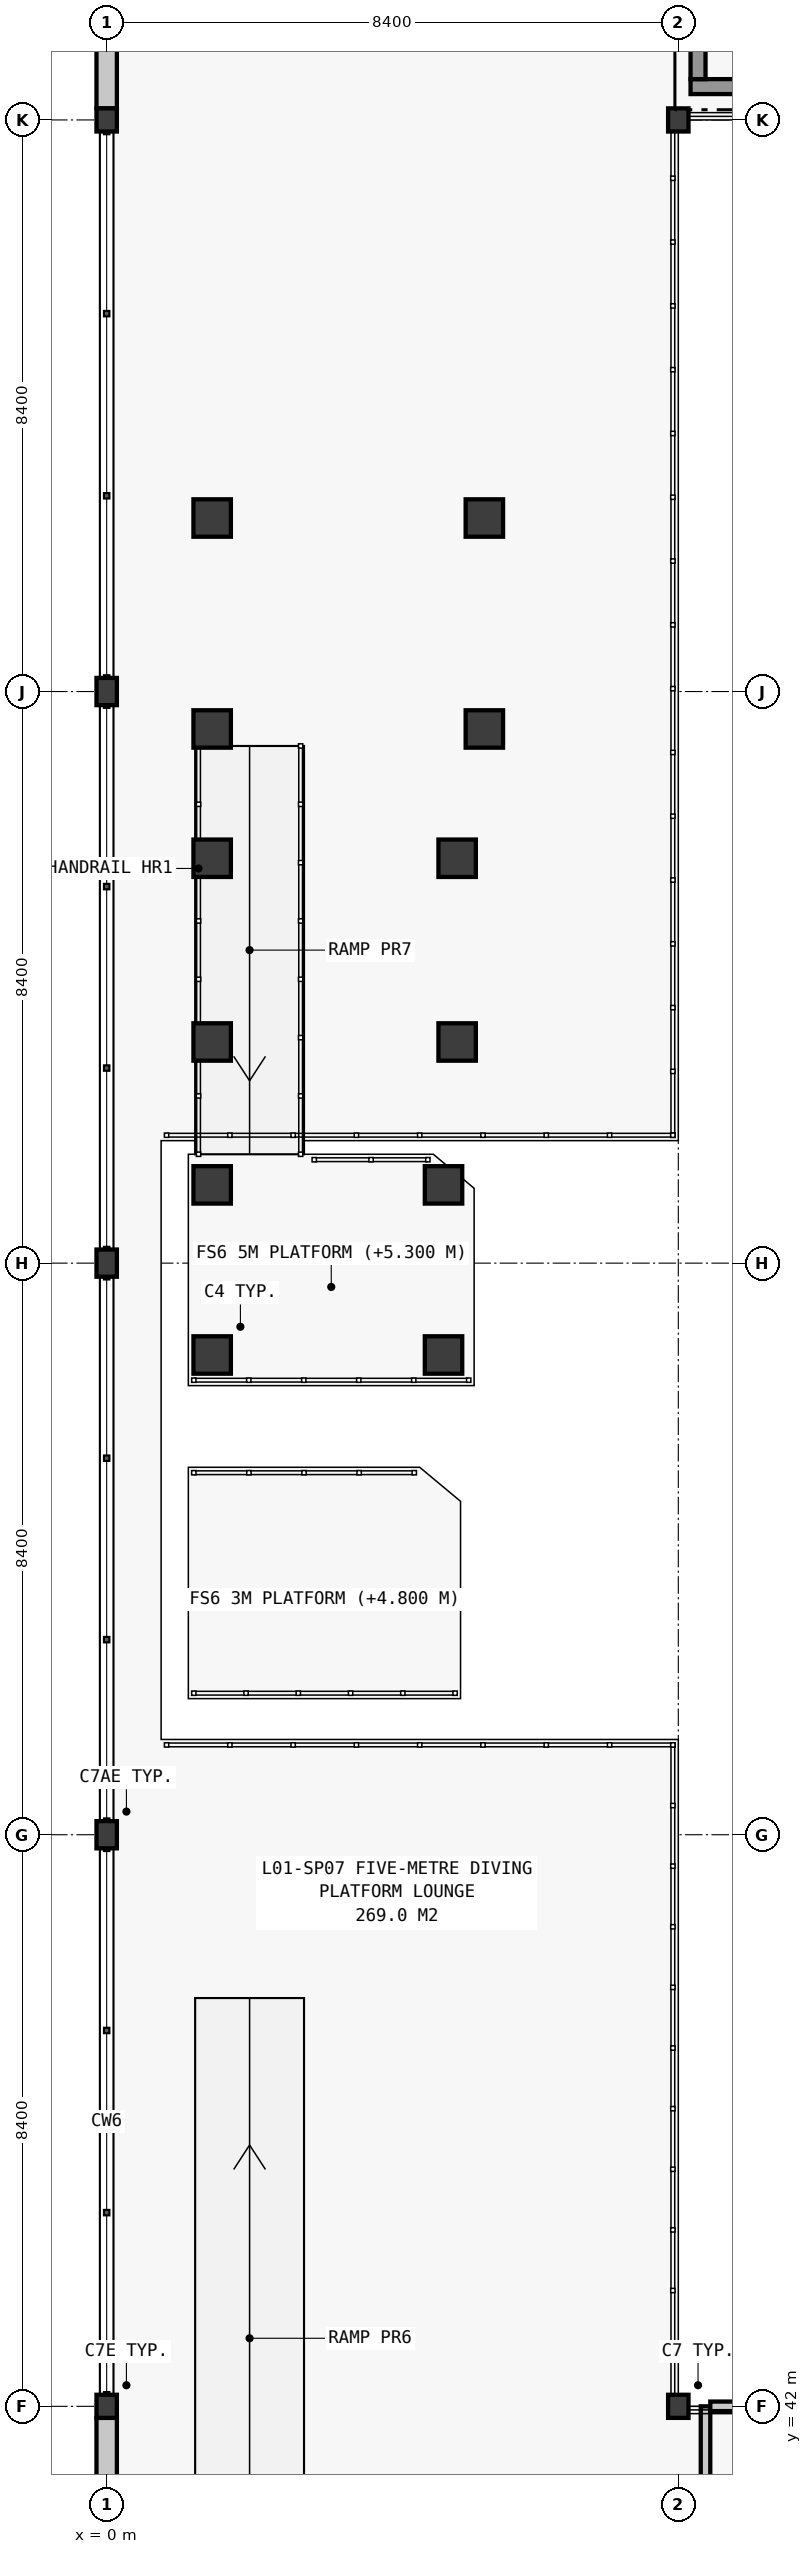
"""IFC4 building model, lengths in metres.
Left out: names, types, materials, properties, quantities, classifications, styles, units other than length and angle.
Written with IfcOpenShell. Run it as: python <this file> out.ifc"""

import sys

from ifc_helpers import new_model, si_unit, direction, frame, frame_2d, origin, origin_2d, place, context, subcontext, project, spatial, rectangle, i_section, extrude, element, save


model = new_model("IFC4")
c1 = context("Model", 3, precision=1e-05, world=origin(), true_north=direction((0.0, 1.0)))
c2 = subcontext(c1, "Body", "Model", "MODEL_VIEW")
j1 = project(units=[si_unit("LENGTHUNIT", "METRE"), si_unit("PLANEANGLEUNIT", "RADIAN")], contexts=[c1])
p1 = place(None, origin())
s1 = spatial("IfcSite", under=j1, at=p1, CompositionType="ELEMENT")
p2 = place(p1, origin())
s2 = spatial("IfcBuilding", under=s1, at=p2, CompositionType="ELEMENT")
p3 = place(p2, frame((0.0, 0.0, 4.8)))
s3 = spatial("IfcBuildingStorey", under=s2, at=p3, CompositionType="ELEMENT", Elevation=4.8)
p4 = place(p3, frame((0.0, 42.0, 0.0), z_axis=(0.0, 0.0, 1.0), x_axis=(1.0, 0.0, 0.0)))
e1 = element("IfcColumn", 1, at=p4, inside=s3, PredefinedType="COLUMN", context=c2, shape_type="SweptSolid", body=[
    extrude(i_section(OverallWidth=0.3, OverallDepth=0.34, WebThickness=0.012, FlangeThickness=0.021, FilletRadius=0.027, at=origin_2d()), origin(), (0.0, 0.0, 1.0), 4.2),
])
for number, where, z_axis, x_axis in (
    (2, (0.0, 50.4, 0.0), (0.0, 0.0, 1.0), (1.0, 0.0, 0.0)),
    (3, (0.0, 58.8, 0.0), (0.0, 0.0, 1.0), (1.0, 0.0, 0.0)),
    (4, (0.0, 67.2, 0.0), (0.0, 0.0, 1.0), (1.0, 0.0, 0.0)),
):
    element("IfcColumn", number, at=place(p3, frame(where, z_axis=z_axis, x_axis=x_axis)), inside=s3, PredefinedType="COLUMN", context=c2, shape_type="SweptSolid", body=[
        extrude(i_section(OverallWidth=0.3, OverallDepth=0.4, WebThickness=0.013, FlangeThickness=0.024, FilletRadius=0.027, at=origin_2d()), origin(), (0.0, 0.0, 1.0), 4.2),
    ])
p5 = place(p3, frame((0.0, 75.6, 0.0), z_axis=(0.0, 0.0, 1.0), x_axis=(1.0, 0.0, 0.0)))
e5 = element("IfcColumn", 5, at=p5, inside=s3, PredefinedType="COLUMN", context=c2, shape_type="SweptSolid", body=[
    extrude(i_section(OverallWidth=0.3, OverallDepth=0.34, WebThickness=0.012, FlangeThickness=0.021, FilletRadius=0.027, at=origin_2d()), origin(), (0.0, 0.0, 1.0), 4.2),
])
for number, where, z_axis, x_axis in (
    (6, (1.55, 57.45, 0.0), (0.0, 0.0, 1.0), (1.0, 0.0, 0.0)),
    (7, (1.55, 59.95, 0.0), (0.0, 0.0, 1.0), (1.0, 0.0, 0.0)),
):
    element("IfcColumn", number, at=place(p3, frame(where, z_axis=z_axis, x_axis=x_axis)), inside=s3, PredefinedType="COLUMN", context=c2, shape_type="SweptSolid", body=[
        extrude(rectangle(XDim=0.55, YDim=0.55, at=origin_2d()), origin(), (0.0, 0.0, 1.0), 0.12),
    ])
for number, where, z_axis, x_axis in (
    (8, (1.55, 62.05, 0.0), (0.0, 0.0, 1.0), (1.0, 0.0, 0.0)),
    (9, (1.55, 64.75, 0.0), (0.0, 0.0, 1.0), (1.0, 0.0, 0.0)),
):
    element("IfcColumn", number, at=place(p3, frame(where, z_axis=z_axis, x_axis=x_axis)), inside=s3, PredefinedType="COLUMN", context=c2, shape_type="SweptSolid", body=[
        extrude(rectangle(XDim=0.55, YDim=0.55, at=origin_2d()), origin(), (0.0, 0.0, 1.0), 3.82),
    ])
for number, where, z_axis, x_axis in (
    (10, (1.55, 66.65, 0.0), (0.0, 0.0, 1.0), (1.0, 0.0, 0.0)),
    (11, (1.55, 69.75, 0.0), (0.0, 0.0, 1.0), (1.0, 0.0, 0.0)),
):
    element("IfcColumn", number, at=place(p3, frame(where, z_axis=z_axis, x_axis=x_axis)), inside=s3, PredefinedType="COLUMN", context=c2, shape_type="SweptSolid", body=[
        extrude(rectangle(XDim=0.55, YDim=0.55, at=origin_2d()), origin(), (0.0, 0.0, 1.0), 4.2),
    ])
for number, where, z_axis, x_axis in (
    (12, (4.95, 57.45, 0.0), (0.0, 0.0, 1.0), (1.0, 0.0, 0.0)),
    (13, (4.95, 59.95, 0.0), (0.0, 0.0, 1.0), (1.0, 0.0, 0.0)),
):
    element("IfcColumn", number, at=place(p3, frame(where, z_axis=z_axis, x_axis=x_axis)), inside=s3, PredefinedType="COLUMN", context=c2, shape_type="SweptSolid", body=[
        extrude(rectangle(XDim=0.55, YDim=0.55, at=origin_2d()), origin(), (0.0, 0.0, 1.0), 0.12),
    ])
for number, where, z_axis, x_axis in (
    (14, (5.15, 62.05, 0.0), (0.0, 0.0, 1.0), (1.0, 0.0, 0.0)),
    (15, (5.15, 64.75, 0.0), (0.0, 0.0, 1.0), (1.0, 0.0, 0.0)),
):
    element("IfcColumn", number, at=place(p3, frame(where, z_axis=z_axis, x_axis=x_axis)), inside=s3, PredefinedType="COLUMN", context=c2, shape_type="SweptSolid", body=[
        extrude(rectangle(XDim=0.55, YDim=0.55, at=origin_2d()), origin(), (0.0, 0.0, 1.0), 3.82),
    ])
for number, where, z_axis, x_axis in (
    (16, (5.55, 66.65, 0.0), (0.0, 0.0, 1.0), (1.0, 0.0, 0.0)),
    (17, (5.55, 69.75, 0.0), (0.0, 0.0, 1.0), (1.0, 0.0, 0.0)),
):
    element("IfcColumn", number, at=place(p3, frame(where, z_axis=z_axis, x_axis=x_axis)), inside=s3, PredefinedType="COLUMN", context=c2, shape_type="SweptSolid", body=[
        extrude(rectangle(XDim=0.55, YDim=0.55, at=origin_2d()), origin(), (0.0, 0.0, 1.0), 4.2),
    ])
for number, where, z_axis, x_axis in (
    (18, (8.4, 42.0, 0.0), (0.0, 0.0, 1.0), (1.0, 0.0, 0.0)),
    (19, (8.4, 75.6, 0.0), (0.0, 0.0, 1.0), (1.0, 0.0, 0.0)),
):
    element("IfcColumn", number, at=place(p3, frame(where, z_axis=z_axis, x_axis=x_axis)), inside=s3, PredefinedType="COLUMN", context=c2, shape_type="SweptSolid", body=[
        extrude(i_section(OverallWidth=0.3, OverallDepth=0.34, WebThickness=0.012, FlangeThickness=0.021, FilletRadius=0.027, at=origin_2d()), origin(), (0.0, 0.0, 1.0), 4.2),
    ])
for number, where, z_axis, x_axis in (
    (20, (0.0, 41.83, 0.0), (0.0, 0.0, 1.0), (0.0, -1.0, 0.0)),
    (21, (0.0, 83.83, 0.0), (0.0, 0.0, 1.0), (0.0, -1.0, 0.0)),
):
    element("IfcWall", number, at=place(p3, frame(where, z_axis=z_axis, x_axis=x_axis)), inside=s3, PredefinedType="STANDARD", context=c2, shape_type="SweptSolid", body=[
        extrude(rectangle(XDim=8.06, YDim=0.3, at=frame_2d((4.03, 0.0))), origin(), (0.0, 0.0, 1.0), 3.396),
    ])
p6 = place(p3, frame((8.58, 76.09, 0.0), z_axis=(0.0, 0.0, 1.0), x_axis=(1.0, 0.0, 0.0)))
e22 = element("IfcWall", 22, at=p6, inside=s3, PredefinedType="SOLIDWALL", context=c2, shape_type="SweptSolid", body=[
    extrude(rectangle(XDim=8.12, YDim=0.22, at=frame_2d((4.06, 0.0))), origin(), (0.0, 0.0, 1.0), 3.94),
])
p7 = place(p3, frame((8.69, 79.63, 0.0), z_axis=(0.0, 0.0, 1.0), x_axis=(0.0, -1.0, 0.0)))
e23 = element("IfcWall", 23, at=p7, inside=s3, PredefinedType="SOLIDWALL", context=c2, shape_type="SweptSolid", body=[
    extrude(rectangle(XDim=3.43, YDim=0.22, at=frame_2d((1.715, 0.0))), origin(), (0.0, 0.0, 1.0), 3.94),
])
p8 = place(p7, frame((1.115, 0.0, 0.0)))
e24 = element("IfcOpeningElement", 24, at=p8, cuts=e23, PredefinedType="OPENING", context=c2, shape_type="SweptSolid", body=[
    extrude(rectangle(XDim=1.2, YDim=2.2, at=frame_2d((0.6, 1.1))), frame((0.0, 0.125, 0.0), z_axis=(0.0, -1.0, 0.0), x_axis=(1.0, 0.0, 0.0)), (0.0, 0.0, 1.0), 0.25),
])
p9 = place(p3, frame((8.8, 38.97, 0.0), z_axis=(0.0, 0.0, 1.0), x_axis=(0.0, 1.0, 0.0)))
e25 = element("IfcWall", 25, at=p9, inside=s3, PredefinedType="PARTITIONING", context=c2, shape_type="SweptSolid", body=[
    extrude(rectangle(XDim=3.03, YDim=0.14, at=frame_2d((1.515, 0.0))), origin(), (0.0, 0.0, 1.0), 3.94),
])
p10 = place(p9, frame((0.918, 0.0, 0.0)))
e26 = element("IfcOpeningElement", 26, at=p10, cuts=e25, PredefinedType="OPENING", context=c2, shape_type="SweptSolid", body=[
    extrude(rectangle(XDim=0.95, YDim=2.15, at=frame_2d((0.475, 1.075))), frame((0.0, 0.085, 0.0), z_axis=(0.0, -1.0, 0.0), x_axis=(1.0, 0.0, 0.0)), (0.0, 0.0, 1.0), 0.17),
])
p11 = place(p3, frame((8.87, 42.0, 0.0), z_axis=(0.0, 0.0, 1.0), x_axis=(1.0, 0.0, 0.0)))
e27 = element("IfcWall", 27, at=p11, inside=s3, PredefinedType="PARTITIONING", context=c2, shape_type="SweptSolid", body=[
    extrude(rectangle(XDim=16.06, YDim=0.14, at=frame_2d((8.03, 0.0))), origin(), (0.0, 0.0, 1.0), 3.396),
])
save(model, sys.argv[1])
